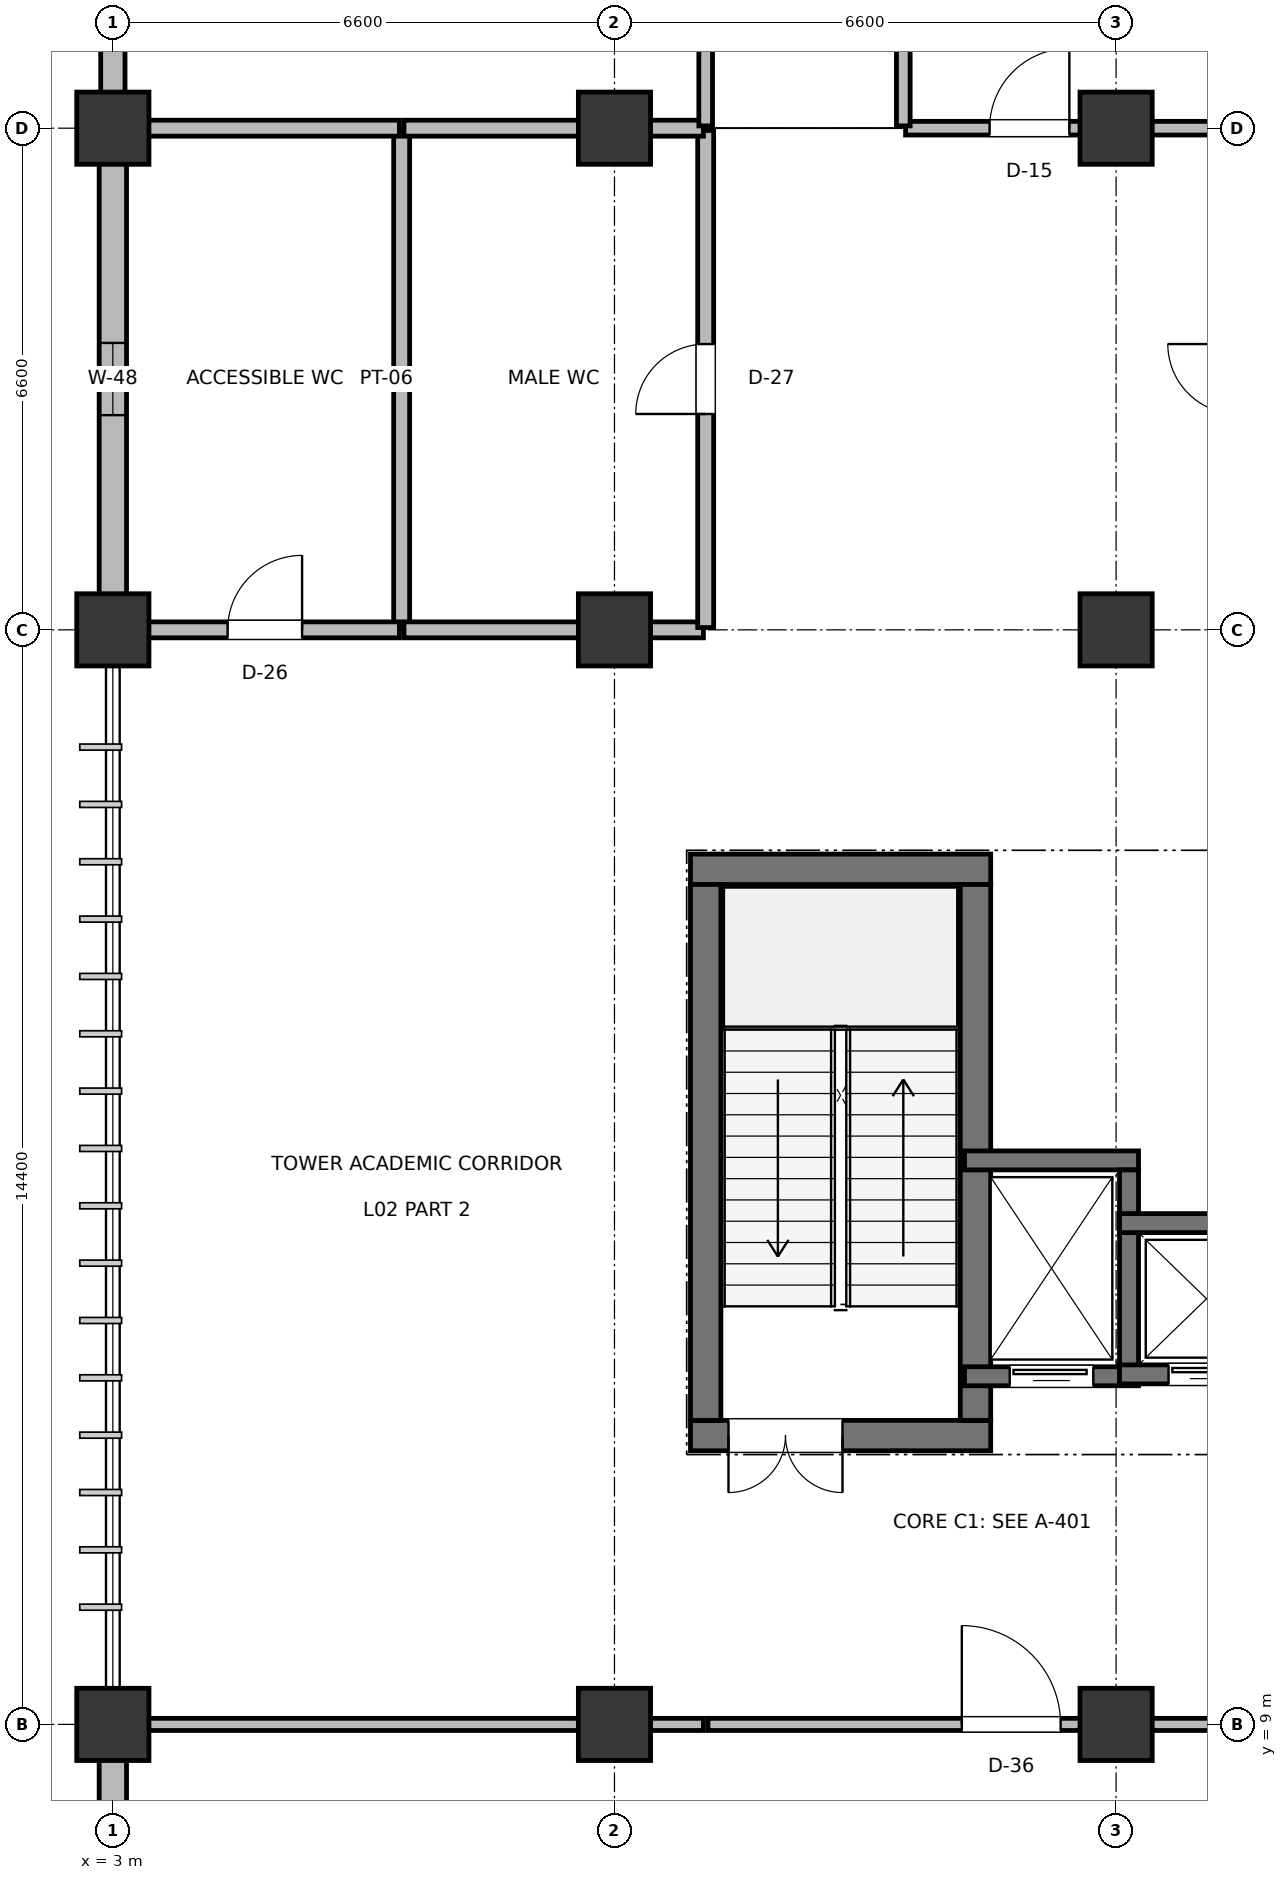
"""IFC4 building model, lengths in metres.
Left out: names, types, materials, properties, quantities, classifications, styles, units other than length and angle.
Written with IfcOpenShell. Run it as: python <this file> out.ifc"""

import sys

from ifc_helpers import new_model, si_unit, direction, frame, frame_2d, origin, origin_2d, place, context, subcontext, project, spatial, rectangle, extrude, element, fill, save


model = new_model("IFC4")
c1 = context("Model", 3, precision=1e-05, world=origin(), true_north=direction((0.0, 1.0)))
c2 = subcontext(c1, "Body", "Model", "MODEL_VIEW")
j1 = project(units=[si_unit("LENGTHUNIT", "METRE"), si_unit("PLANEANGLEUNIT", "RADIAN")], contexts=[c1])
p1 = place(None, origin())
s1 = spatial("IfcSite", under=j1, at=p1, CompositionType="ELEMENT")
p2 = place(p1, origin())
s2 = spatial("IfcBuilding", under=s1, at=p2, CompositionType="ELEMENT")
p3 = place(p2, frame((0.0, 0.0, 10.2)))
s3 = spatial("IfcBuildingStorey", under=s2, at=p3, CompositionType="ELEMENT", Elevation=10.2)
for number, where, z_axis, x_axis in (
    (1, (3.0, 9.0, 0.0), (0.0, 0.0, 1.0), (1.0, 0.0, 0.0)),
    (2, (3.0, 23.4, 0.0), (0.0, 0.0, 1.0), (1.0, 0.0, 0.0)),
    (3, (3.0, 30.0, 0.0), (0.0, 0.0, 1.0), (1.0, 0.0, 0.0)),
    (4, (9.6, 9.0, 0.0), (0.0, 0.0, 1.0), (1.0, 0.0, 0.0)),
    (5, (9.6, 23.4, 0.0), (0.0, 0.0, 1.0), (1.0, 0.0, 0.0)),
    (6, (9.6, 30.0, 0.0), (0.0, 0.0, 1.0), (1.0, 0.0, 0.0)),
    (7, (16.2, 9.0, 0.0), (0.0, 0.0, 1.0), (1.0, 0.0, 0.0)),
    (8, (16.2, 23.4, 0.0), (0.0, 0.0, 1.0), (1.0, 0.0, 0.0)),
    (9, (16.2, 30.0, 0.0), (0.0, 0.0, 1.0), (1.0, 0.0, 0.0)),
):
    element("IfcColumn", number, at=place(p3, frame(where, z_axis=z_axis, x_axis=x_axis)), inside=s3, PredefinedType="COLUMN", context=c2, shape_type="SweptSolid", body=[
        extrude(rectangle(XDim=0.95, YDim=0.95, at=origin_2d()), origin(), (0.0, 0.0, 1.0), 4.8),
    ])
p4 = place(p3, frame((3.0, 3.465, 0.0), z_axis=(0.0, 0.0, 1.0), x_axis=(0.0, 1.0, 0.0)))
e10 = element("IfcWall", 10, at=p4, inside=s3, PredefinedType="SOLIDWALL", context=c2, shape_type="SweptSolid", body=[
    extrude(rectangle(XDim=5.07, YDim=0.36, at=frame_2d((2.535, 0.0))), origin(), (0.0, 0.0, 1.0), 3.875),
])
p5 = place(p4, frame((2.06, 0.0, 0.9)))
e11 = element("IfcOpeningElement", 11, at=p5, cuts=e10, PredefinedType="OPENING", context=c2, shape_type="SweptSolid", body=[
    extrude(rectangle(XDim=0.95, YDim=1.55, at=frame_2d((0.475, 0.775))), frame((0.0, 0.19, 0.0), z_axis=(0.0, -1.0, 0.0), x_axis=(1.0, 0.0, 0.0)), (0.0, 0.0, 1.0), 0.38),
])
p6 = place(p3, frame((3.0, 23.855, 0.0), z_axis=(0.0, 0.0, 1.0), x_axis=(0.0, 1.0, 0.0)))
e12 = element("IfcWall", 12, at=p6, inside=s3, PredefinedType="SOLIDWALL", context=c2, shape_type="SweptSolid", body=[
    extrude(rectangle(XDim=5.69, YDim=0.36, at=frame_2d((2.845, 0.0))), origin(), (0.0, 0.0, 1.0), 3.875),
])
p7 = place(p6, frame((2.37, 0.0, 0.9)))
e13 = element("IfcOpeningElement", 13, at=p7, cuts=e12, PredefinedType="OPENING", context=c2, shape_type="SweptSolid", body=[
    extrude(rectangle(XDim=0.95, YDim=1.75, at=frame_2d((0.475, 0.875))), frame((0.0, 0.19, 0.0), z_axis=(0.0, -1.0, 0.0), x_axis=(1.0, 0.0, 0.0)), (0.0, 0.0, 1.0), 0.38),
])
p8 = place(p3, frame((3.0, 30.455, 0.0), z_axis=(0.0, 0.0, 1.0), x_axis=(0.0, 1.0, 0.0)))
e14 = element("IfcWall", 14, at=p8, inside=s3, PredefinedType="SOLIDWALL", context=c2, shape_type="SweptSolid", body=[
    extrude(rectangle(XDim=8.16, YDim=0.32, at=frame_2d((4.08, 0.0))), origin(), (0.0, 0.0, 1.0), 3.775),
])
p9 = place(p8, frame((2.83, 0.0, 0.9)))
e15 = element("IfcOpeningElement", 15, at=p9, cuts=e14, PredefinedType="OPENING", context=c2, shape_type="SweptSolid", body=[
    extrude(rectangle(XDim=2.5, YDim=1.95, at=frame_2d((1.25, 0.975))), frame((0.0, 0.17, 0.0), z_axis=(0.0, -1.0, 0.0), x_axis=(1.0, 0.0, 0.0)), (0.0, 0.0, 1.0), 0.34),
])
p10 = place(p3, frame((10.6, 12.8, 0.0), z_axis=(0.0, 0.0, 1.0), x_axis=(1.0, 0.0, 0.0)))
e16 = element("IfcWall", 16, at=p10, inside=s3, PredefinedType="SHEAR", context=c2, shape_type="SweptSolid", body=[
    extrude(rectangle(XDim=3.95, YDim=0.4, at=frame_2d((1.975, 0.0))), origin(), (0.0, 0.0, 1.0), 4.58),
])
p11 = place(p10, frame((0.5, 0.0, 0.0)))
e17 = element("IfcOpeningElement", 17, at=p11, cuts=e16, PredefinedType="OPENING", context=c2, shape_type="SweptSolid", body=[
    extrude(rectangle(XDim=1.5, YDim=2.2, at=frame_2d((0.75, 1.1))), frame((0.0, 0.21, 0.0), z_axis=(0.0, -1.0, 0.0), x_axis=(1.0, 0.0, 0.0)), (0.0, 0.0, 1.0), 0.42),
])
p12 = place(p3, frame((10.6, 20.25, 0.0), z_axis=(0.0, 0.0, 1.0), x_axis=(1.0, 0.0, 0.0)))
e18 = element("IfcWall", 18, at=p12, inside=s3, PredefinedType="SHEAR", context=c2, shape_type="SweptSolid", body=[
    extrude(rectangle(XDim=3.95, YDim=0.4, at=frame_2d((1.975, 0.0))), origin(), (0.0, 0.0, 1.0), 4.58),
])
for number, where, z_axis, x_axis in (
    (19, (10.8, 13.0, 0.0), (0.0, 0.0, 1.0), (0.0, 1.0, 0.0)),
    (20, (14.35, 13.0, 0.0), (0.0, 0.0, 1.0), (0.0, 1.0, 0.0)),
):
    element("IfcWall", number, at=place(p3, frame(where, z_axis=z_axis, x_axis=x_axis)), inside=s3, PredefinedType="SHEAR", context=c2, shape_type="SweptSolid", body=[
        extrude(rectangle(XDim=7.05, YDim=0.4, at=frame_2d((3.525, 0.0))), origin(), (0.0, 0.0, 1.0), 4.58),
    ])
p13 = place(p3, frame((14.205, 13.58, 0.0), z_axis=(0.0, 0.0, 1.0), x_axis=(1.0, 0.0, 0.0)))
e21 = element("IfcWall", 21, at=p13, inside=s3, PredefinedType="SHEAR", context=c2, shape_type="SweptSolid", body=[
    extrude(rectangle(XDim=2.29, YDim=0.25, at=frame_2d((1.145, 0.0))), origin(), (0.0, 0.0, 1.0), 4.56),
])
p14 = place(p13, frame((0.595, 0.0, 0.0)))
e22 = element("IfcOpeningElement", 22, at=p14, cuts=e21, PredefinedType="OPENING", context=c2, shape_type="SweptSolid", body=[
    extrude(rectangle(XDim=1.1, YDim=2.2, at=frame_2d((0.55, 1.1))), frame((0.0, 0.135, 0.0), z_axis=(0.0, -1.0, 0.0), x_axis=(1.0, 0.0, 0.0)), (0.0, 0.0, 1.0), 0.27),
])
p15 = place(p3, frame((14.205, 16.42, 0.0), z_axis=(0.0, 0.0, 1.0), x_axis=(1.0, 0.0, 0.0)))
e23 = element("IfcWall", 23, at=p15, inside=s3, PredefinedType="SHEAR", context=c2, shape_type="SweptSolid", body=[
    extrude(rectangle(XDim=2.29, YDim=0.25, at=frame_2d((1.145, 0.0))), origin(), (0.0, 0.0, 1.0), 4.56),
])
p16 = place(p3, frame((16.37, 13.705, 0.0), z_axis=(0.0, 0.0, 1.0), x_axis=(0.0, 1.0, 0.0)))
e24 = element("IfcWall", 24, at=p16, inside=s3, PredefinedType="SHEAR", context=c2, shape_type="SweptSolid", body=[
    extrude(rectangle(XDim=2.59, YDim=0.25, at=frame_2d((1.295, 0.0))), origin(), (0.0, 0.0, 1.0), 4.56),
])
p17 = place(p3, frame((16.245, 13.605, 0.0), z_axis=(0.0, 0.0, 1.0), x_axis=(1.0, 0.0, 0.0)))
e25 = element("IfcWall", 25, at=p17, inside=s3, PredefinedType="SHEAR", context=c2, shape_type="SweptSolid", body=[
    extrude(rectangle(XDim=2.29, YDim=0.25, at=frame_2d((1.145, 0.0))), origin(), (0.0, 0.0, 1.0), 4.56),
])
p18 = place(p17, frame((0.645, 0.0, 0.0)))
e26 = element("IfcOpeningElement", 26, at=p18, cuts=e25, PredefinedType="OPENING", context=c2, shape_type="SweptSolid", body=[
    extrude(rectangle(XDim=1.0, YDim=2.15, at=frame_2d((0.5, 1.075))), frame((0.0, 0.135, 0.0), z_axis=(0.0, -1.0, 0.0), x_axis=(1.0, 0.0, 0.0)), (0.0, 0.0, 1.0), 0.27),
])
p19 = place(p3, frame((16.245, 15.595, 0.0), z_axis=(0.0, 0.0, 1.0), x_axis=(1.0, 0.0, 0.0)))
e27 = element("IfcWall", 27, at=p19, inside=s3, PredefinedType="SHEAR", context=c2, shape_type="SweptSolid", body=[
    extrude(rectangle(XDim=2.29, YDim=0.25, at=frame_2d((1.145, 0.0))), origin(), (0.0, 0.0, 1.0), 4.56),
])
p20 = place(p3, frame((3.23, 9.0, 0.0), z_axis=(0.0, 0.0, 1.0), x_axis=(1.0, 0.0, 0.0)))
e28 = element("IfcWall", 28, at=p20, inside=s3, PredefinedType="PARTITIONING", context=c2, shape_type="SweptSolid", body=[
    extrude(rectangle(XDim=7.54, YDim=0.16, at=frame_2d((3.77, 0.0))), origin(), (0.0, 0.0, 1.0), 3.695),
])
p21 = place(p3, frame((10.83, 9.0, 0.0), z_axis=(0.0, 0.0, 1.0), x_axis=(1.0, 0.0, 0.0)))
e29 = element("IfcWall", 29, at=p21, inside=s3, PredefinedType="PARTITIONING", context=c2, shape_type="SweptSolid", body=[
    extrude(rectangle(XDim=8.34, YDim=0.16, at=frame_2d((4.17, 0.0))), origin(), (0.0, 0.0, 1.0), 3.695),
])
p22 = place(p21, frame((3.34, 0.0, 0.0)))
e30 = element("IfcOpeningElement", 30, at=p22, cuts=e29, PredefinedType="OPENING", context=c2, shape_type="SweptSolid", body=[
    extrude(rectangle(XDim=1.3, YDim=2.2, at=frame_2d((0.65, 1.1))), frame((0.0, 0.09, 0.0), z_axis=(0.0, -1.0, 0.0), x_axis=(1.0, 0.0, 0.0)), (0.0, 0.0, 1.0), 0.18),
])
p23 = place(p3, frame((6.8, 23.43, 0.0), z_axis=(0.0, 0.0, 1.0), x_axis=(0.0, 1.0, 0.0)))
e31 = element("IfcWall", 31, at=p23, inside=s3, PredefinedType="PLUMBINGWALL", context=c2, shape_type="SweptSolid", body=[
    extrude(rectangle(XDim=6.54, YDim=0.21, at=frame_2d((3.27, 0.0))), origin(), (0.0, 0.0, 1.0), 3.615),
])
p24 = place(p3, frame((3.23, 23.4, 0.0), z_axis=(0.0, 0.0, 1.0), x_axis=(1.0, 0.0, 0.0)))
e32 = element("IfcWall", 32, at=p24, inside=s3, PredefinedType="PLUMBINGWALL", context=c2, shape_type="SweptSolid", body=[
    extrude(rectangle(XDim=3.54, YDim=0.21, at=frame_2d((1.77, 0.0))), origin(), (0.0, 0.0, 1.0), 3.615),
])
p25 = place(p24, frame((1.28, 0.0, 0.0)))
e33 = element("IfcOpeningElement", 33, at=p25, cuts=e32, PredefinedType="OPENING", context=c2, shape_type="SweptSolid", body=[
    extrude(rectangle(XDim=0.98, YDim=2.1, at=frame_2d((0.49, 1.05))), frame((0.0, 0.115, 0.0), z_axis=(0.0, -1.0, 0.0), x_axis=(1.0, 0.0, 0.0)), (0.0, 0.0, 1.0), 0.23),
])
p26 = place(p3, frame((3.23, 30.0, 0.0), z_axis=(0.0, 0.0, 1.0), x_axis=(1.0, 0.0, 0.0)))
e34 = element("IfcWall", 34, at=p26, inside=s3, PredefinedType="PLUMBINGWALL", context=c2, shape_type="SweptSolid", body=[
    extrude(rectangle(XDim=3.54, YDim=0.21, at=frame_2d((1.77, 0.0))), origin(), (0.0, 0.0, 1.0), 3.725),
])
p27 = place(p3, frame((6.83, 23.4, 0.0), z_axis=(0.0, 0.0, 1.0), x_axis=(1.0, 0.0, 0.0)))
e35 = element("IfcWall", 35, at=p27, inside=s3, PredefinedType="PLUMBINGWALL", context=c2, shape_type="SweptSolid", body=[
    extrude(rectangle(XDim=3.94, YDim=0.21, at=frame_2d((1.97, 0.0))), origin(), (0.0, 0.0, 1.0), 3.615),
])
p28 = place(p3, frame((10.8, 23.43, 0.0), z_axis=(0.0, 0.0, 1.0), x_axis=(0.0, 1.0, 0.0)))
e36 = element("IfcWall", 36, at=p28, inside=s3, PredefinedType="PLUMBINGWALL", context=c2, shape_type="SweptSolid", body=[
    extrude(rectangle(XDim=6.54, YDim=0.21, at=frame_2d((3.27, 0.0))), origin(), (0.0, 0.0, 1.0), 3.655),
])
p29 = place(p28, frame((2.81, 0.0, 0.0)))
e37 = element("IfcOpeningElement", 37, at=p29, cuts=e36, PredefinedType="OPENING", context=c2, shape_type="SweptSolid", body=[
    extrude(rectangle(XDim=0.92, YDim=2.1, at=frame_2d((0.46, 1.05))), frame((0.0, 0.115, 0.0), z_axis=(0.0, -1.0, 0.0), x_axis=(1.0, 0.0, 0.0)), (0.0, 0.0, 1.0), 0.23),
])
p30 = place(p3, frame((6.83, 30.0, 0.0), z_axis=(0.0, 0.0, 1.0), x_axis=(1.0, 0.0, 0.0)))
e38 = element("IfcWall", 38, at=p30, inside=s3, PredefinedType="PLUMBINGWALL", context=c2, shape_type="SweptSolid", body=[
    extrude(rectangle(XDim=3.94, YDim=0.21, at=frame_2d((1.97, 0.0))), origin(), (0.0, 0.0, 1.0), 3.655),
])
p31 = place(p3, frame((13.43, 30.0, 0.0), z_axis=(0.0, 0.0, 1.0), x_axis=(1.0, 0.0, 0.0)))
e39 = element("IfcWall", 39, at=p31, inside=s3, PredefinedType="PARTITIONING", context=c2, shape_type="SweptSolid", body=[
    extrude(rectangle(XDim=4.34, YDim=0.18, at=frame_2d((2.17, 0.0))), origin(), (0.0, 0.0, 1.0), 3.655),
])
p32 = place(p31, frame((1.105, 0.0, 0.0)))
e40 = element("IfcOpeningElement", 40, at=p32, cuts=e39, PredefinedType="OPENING", context=c2, shape_type="SweptSolid", body=[
    extrude(rectangle(XDim=1.05, YDim=2.2, at=frame_2d((0.525, 1.1))), frame((0.0, 0.1, 0.0), z_axis=(0.0, -1.0, 0.0), x_axis=(1.0, 0.0, 0.0)), (0.0, 0.0, 1.0), 0.2),
])
p33 = place(p3, frame((10.8, 30.03, 0.0), z_axis=(0.0, 0.0, 1.0), x_axis=(0.0, 1.0, 0.0)))
e41 = element("IfcWall", 41, at=p33, inside=s3, PredefinedType="PARTITIONING", context=c2, shape_type="SweptSolid", body=[
    extrude(rectangle(XDim=25.14, YDim=0.18, at=frame_2d((12.57, 0.0))), origin(), (0.0, 0.0, 1.0), 3.455),
])
p34 = place(p33, frame((11.87, 0.0, 0.0)))
e42 = element("IfcOpeningElement", 42, at=p34, cuts=e41, PredefinedType="OPENING", context=c2, shape_type="SweptSolid", body=[
    extrude(rectangle(XDim=1.4, YDim=2.2, at=frame_2d((0.7, 1.1))), frame((0.0, 0.1, 0.0), z_axis=(0.0, -1.0, 0.0), x_axis=(1.0, 0.0, 0.0)), (0.0, 0.0, 1.0), 0.2),
])
p35 = place(p3, frame((13.4, 30.03, 0.0), z_axis=(0.0, 0.0, 1.0), x_axis=(0.0, 1.0, 0.0)))
e43 = element("IfcWall", 43, at=p35, inside=s3, PredefinedType="PARTITIONING", context=c2, shape_type="SweptSolid", body=[
    extrude(rectangle(XDim=25.14, YDim=0.18, at=frame_2d((12.57, 0.0))), origin(), (0.0, 0.0, 1.0), 3.455),
])
p36 = place(p35, frame((11.87, 0.0, 0.0)))
e44 = element("IfcOpeningElement", 44, at=p36, cuts=e43, PredefinedType="OPENING", context=c2, shape_type="SweptSolid", body=[
    extrude(rectangle(XDim=1.4, YDim=2.2, at=frame_2d((0.7, 1.1))), frame((0.0, 0.1, 0.0), z_axis=(0.0, -1.0, 0.0), x_axis=(1.0, 0.0, 0.0)), (0.0, 0.0, 1.0), 0.2),
])
p37 = place(p7, origin())
e45 = element("IfcWindow", 45, at=p37, inside=s3, PartitioningType="DOUBLE_PANEL_VERTICAL", PredefinedType="WINDOW", context=c2, shape_type="SweptSolid", body=[
    extrude(rectangle(XDim=0.95, YDim=1.75, at=frame_2d((0.475, 0.875))), frame((0.0, 0.03, 0.0), z_axis=(0.0, -1.0, 0.0), x_axis=(1.0, 0.0, 0.0)), (0.0, 0.0, 1.0), 0.06),
])
fill(e13, e45)
p38 = place(p11, frame((1.5, 0.0, 0.0), z_axis=(0.0, 0.0, 1.0), x_axis=(-1.0, 0.0, 0.0)))
e46 = element("IfcDoor", 46, at=p38, inside=s3, OperationType="DOUBLE_DOOR_SINGLE_SWING", PredefinedType="DOOR", context=c2, shape_type="SweptSolid", body=[
    extrude(rectangle(XDim=1.5, YDim=2.2, at=frame_2d((0.75, 1.1))), frame((0.0, 0.025, 0.0), z_axis=(0.0, -1.0, 0.0), x_axis=(1.0, 0.0, 0.0)), (0.0, 0.0, 1.0), 0.05),
])
fill(e17, e46)
p39 = place(p14, frame((1.1, 0.0, 0.0), z_axis=(0.0, 0.0, 1.0), x_axis=(-1.0, 0.0, 0.0)))
e47 = element("IfcDoor", 47, at=p39, inside=s3, OperationType="SLIDING_TO_LEFT", PredefinedType="DOOR", context=c2, shape_type="SweptSolid", body=[
    extrude(rectangle(XDim=1.1, YDim=2.2, at=frame_2d((0.55, 1.1))), frame((0.0, 0.025, 0.0), z_axis=(0.0, -1.0, 0.0), x_axis=(1.0, 0.0, 0.0)), (0.0, 0.0, 1.0), 0.05),
])
fill(e22, e47)
p40 = place(p18, frame((1.0, 0.0, 0.0), z_axis=(0.0, 0.0, 1.0), x_axis=(-1.0, 0.0, 0.0)))
e48 = element("IfcDoor", 48, at=p40, inside=s3, OperationType="SLIDING_TO_LEFT", PredefinedType="DOOR", context=c2, shape_type="SweptSolid", body=[
    extrude(rectangle(XDim=1.0, YDim=2.15, at=frame_2d((0.5, 1.075))), frame((0.0, 0.025, 0.0), z_axis=(0.0, -1.0, 0.0), x_axis=(1.0, 0.0, 0.0)), (0.0, 0.0, 1.0), 0.05),
])
fill(e26, e48)
p41 = place(p22, origin())
e49 = element("IfcDoor", 49, at=p41, inside=s3, OperationType="SINGLE_SWING_LEFT", PredefinedType="DOOR", context=c2, shape_type="SweptSolid", body=[
    extrude(rectangle(XDim=1.3, YDim=2.2, at=frame_2d((0.65, 1.1))), frame((0.0, 0.025, 0.0), z_axis=(0.0, -1.0, 0.0), x_axis=(1.0, 0.0, 0.0)), (0.0, 0.0, 1.0), 0.05),
])
fill(e30, e49)
p42 = place(p25, origin())
e50 = element("IfcDoor", 50, at=p42, inside=s3, OperationType="SINGLE_SWING_RIGHT", PredefinedType="DOOR", context=c2, shape_type="SweptSolid", body=[
    extrude(rectangle(XDim=0.98, YDim=2.1, at=frame_2d((0.49, 1.05))), frame((0.0, 0.025, 0.0), z_axis=(0.0, -1.0, 0.0), x_axis=(1.0, 0.0, 0.0)), (0.0, 0.0, 1.0), 0.05),
])
fill(e33, e50)
p43 = place(p29, origin())
e51 = element("IfcDoor", 51, at=p43, inside=s3, OperationType="SINGLE_SWING_LEFT", PredefinedType="DOOR", context=c2, shape_type="SweptSolid", body=[
    extrude(rectangle(XDim=0.92, YDim=2.1, at=frame_2d((0.46, 1.05))), frame((0.0, 0.025, 0.0), z_axis=(0.0, -1.0, 0.0), x_axis=(1.0, 0.0, 0.0)), (0.0, 0.0, 1.0), 0.05),
])
fill(e37, e51)
p44 = place(p32, origin())
e52 = element("IfcDoor", 52, at=p44, inside=s3, OperationType="SINGLE_SWING_RIGHT", PredefinedType="DOOR", context=c2, shape_type="SweptSolid", body=[
    extrude(rectangle(XDim=1.05, YDim=2.2, at=frame_2d((0.525, 1.1))), frame((0.0, 0.025, 0.0), z_axis=(0.0, -1.0, 0.0), x_axis=(1.0, 0.0, 0.0)), (0.0, 0.0, 1.0), 0.05),
])
fill(e40, e52)
save(model, sys.argv[1])
